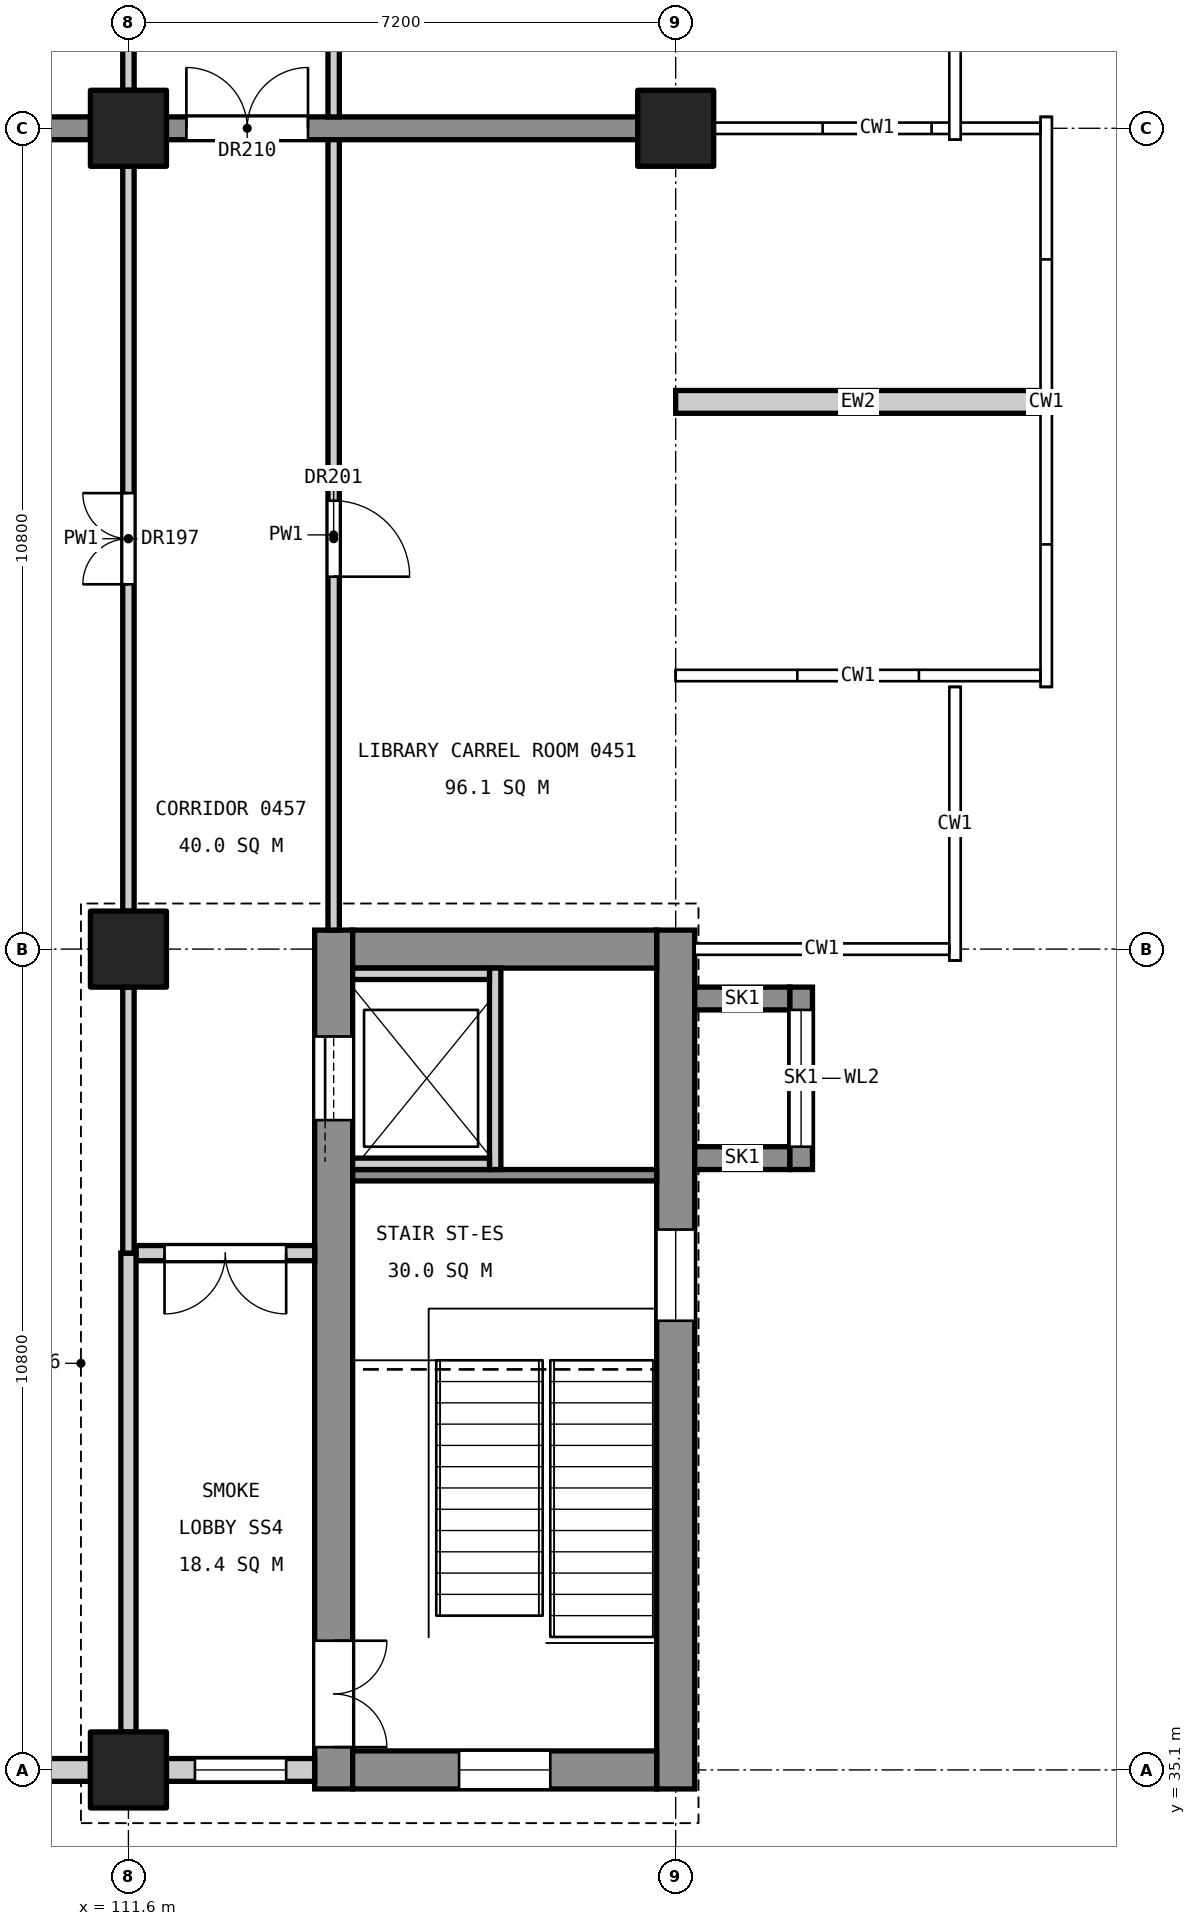
"""IFC4 building model, lengths in metres.
Left out: names, types, materials, properties, quantities, classifications, styles, units other than length and angle.
Written with IfcOpenShell. Run it as: python <this file> out.ifc"""

import sys

from ifc_helpers import new_model, si_unit, direction, frame, frame_2d, origin, origin_2d, place, context, subcontext, project, spatial, rectangle, extrude, element, fill, save


model = new_model("IFC4")
c1 = context("Model", 3, precision=1e-05, world=origin(), true_north=direction((0.0, 1.0)))
c2 = subcontext(c1, "Body", "Model", "MODEL_VIEW")
j1 = project(units=[si_unit("LENGTHUNIT", "METRE"), si_unit("PLANEANGLEUNIT", "RADIAN")], contexts=[c1])
p1 = place(None, origin())
s1 = spatial("IfcSite", under=j1, at=p1, CompositionType="ELEMENT")
p2 = place(p1, origin())
s2 = spatial("IfcBuilding", under=s1, at=p2, CompositionType="ELEMENT")
p3 = place(p2, frame((0.0, 0.0, 22.2)))
s3 = spatial("IfcBuildingStorey", under=s2, at=p3, CompositionType="ELEMENT", Elevation=22.2)
for number, where, z_axis, x_axis in (
    (1, (118.8, 56.7, 0.0), (0.0, 0.0, 1.0), (1.0, 0.0, 0.0)),
    (2, (111.6, 35.1, 0.0), (0.0, 0.0, 1.0), (1.0, 0.0, 0.0)),
    (3, (111.6, 45.9, 0.0), (0.0, 0.0, 1.0), (1.0, 0.0, 0.0)),
    (4, (111.6, 56.7, 0.0), (0.0, 0.0, 1.0), (1.0, 0.0, 0.0)),
):
    element("IfcColumn", number, at=place(p3, frame(where, z_axis=z_axis, x_axis=x_axis)), inside=s3, PredefinedType="COLUMN", context=c2, shape_type="SweptSolid", body=[
        extrude(rectangle(XDim=1.0, YDim=1.0, at=origin_2d()), origin(), (0.0, 0.0, 1.0), 4.8),
    ])
p4 = place(p3, frame((118.8, 34.85, 0.0), z_axis=(0.0, 0.0, 1.0), x_axis=(0.0, 1.0, 0.0)))
e5 = element("IfcWall", 5, at=p4, inside=s3, PredefinedType="SHEAR", context=c2, shape_type="SweptSolid", body=[
    extrude(rectangle(XDim=11.3, YDim=0.5, at=frame_2d((5.65, 0.0))), origin(), (0.0, 0.0, 1.0), 4.55),
])
p5 = place(p4, frame((6.16, 0.0, 3.4)))
e6 = element("IfcOpeningElement", 6, at=p5, cuts=e5, PredefinedType="OPENING", context=c2, shape_type="SweptSolid", body=[
    extrude(rectangle(XDim=1.2, YDim=0.9, at=frame_2d((0.6, 0.45))), frame((0.0, 0.26, 0.0), z_axis=(0.0, -1.0, 0.0), x_axis=(1.0, 0.0, 0.0)), (0.0, 0.0, 1.0), 0.52),
])
p6 = place(p3, frame((114.3, 34.85, 0.0), z_axis=(0.0, 0.0, 1.0), x_axis=(0.0, 1.0, 0.0)))
e7 = element("IfcWall", 7, at=p6, inside=s3, PredefinedType="SHEAR", context=c2, shape_type="SweptSolid", body=[
    extrude(rectangle(XDim=11.3, YDim=0.5, at=frame_2d((5.65, 0.0))), origin(), (0.0, 0.0, 1.0), 4.55),
])
p7 = place(p6, frame((0.55, 0.0, 0.0)))
e8 = element("IfcOpeningElement", 8, at=p7, cuts=e7, PredefinedType="OPENING", context=c2, shape_type="SweptSolid", body=[
    extrude(rectangle(XDim=1.4, YDim=2.1, at=frame_2d((0.7, 1.05))), frame((0.0, 0.26, 0.0), z_axis=(0.0, -1.0, 0.0), x_axis=(1.0, 0.0, 0.0)), (0.0, 0.0, 1.0), 0.52),
])
p8 = place(p6, frame((8.8, 0.0, 0.0)))
e9 = element("IfcOpeningElement", 9, at=p8, cuts=e7, PredefinedType="OPENING", context=c2, shape_type="SweptSolid", body=[
    extrude(rectangle(XDim=1.1, YDim=2.1, at=frame_2d((0.55, 1.05))), frame((0.0, 0.26, 0.0), z_axis=(0.0, -1.0, 0.0), x_axis=(1.0, 0.0, 0.0)), (0.0, 0.0, 1.0), 0.52),
])
p9 = place(p3, frame((118.55, 35.1, 0.0), z_axis=(0.0, 0.0, 1.0), x_axis=(-1.0, 0.0, 0.0)))
e10 = element("IfcWall", 10, at=p9, inside=s3, PredefinedType="SHEAR", context=c2, shape_type="SweptSolid", body=[
    extrude(rectangle(XDim=4.0, YDim=0.5, at=frame_2d((2.0, 0.0))), origin(), (0.0, 0.0, 1.0), 4.55),
])
p10 = place(p9, frame((1.4, 0.0, 3.4)))
e11 = element("IfcOpeningElement", 11, at=p10, cuts=e10, PredefinedType="OPENING", context=c2, shape_type="SweptSolid", body=[
    extrude(rectangle(XDim=1.2, YDim=0.9, at=frame_2d((0.6, 0.45))), frame((0.0, 0.26, 0.0), z_axis=(0.0, -1.0, 0.0), x_axis=(1.0, 0.0, 0.0)), (0.0, 0.0, 1.0), 0.52),
])
p11 = place(p3, frame((118.55, 45.9, 0.0), z_axis=(0.0, 0.0, 1.0), x_axis=(-1.0, 0.0, 0.0)))
e12 = element("IfcWall", 12, at=p11, inside=s3, PredefinedType="SHEAR", context=c2, shape_type="SweptSolid", body=[
    extrude(rectangle(XDim=4.0, YDim=0.5, at=frame_2d((2.0, 0.0))), origin(), (0.0, 0.0, 1.0), 4.55),
])
p12 = place(p3, frame((120.45, 43.0, 0.0), z_axis=(0.0, 0.0, 1.0), x_axis=(0.0, 1.0, 0.0)))
e13 = element("IfcWall", 13, at=p12, inside=s3, PredefinedType="SHEAR", context=c2, shape_type="SweptSolid", body=[
    extrude(rectangle(XDim=2.4, YDim=0.3, at=frame_2d((1.2, 0.0))), origin(), (0.0, 0.0, 1.0), 4.8),
])
p13 = place(p12, frame((0.3, 0.0, 3.0)))
e14 = element("IfcOpeningElement", 14, at=p13, cuts=e13, PredefinedType="OPENING", context=c2, shape_type="SweptSolid", body=[
    extrude(rectangle(XDim=1.8, YDim=1.2, at=frame_2d((0.9, 0.6))), frame((0.0, 0.16, 0.0), z_axis=(0.0, -1.0, 0.0), x_axis=(1.0, 0.0, 0.0)), (0.0, 0.0, 1.0), 0.32),
])
for number, where, z_axis, x_axis in (
    (15, (119.05, 43.15, 0.0), (0.0, 0.0, 1.0), (1.0, 0.0, 0.0)),
    (16, (119.05, 45.25, 0.0), (0.0, 0.0, 1.0), (1.0, 0.0, 0.0)),
):
    element("IfcWall", number, at=place(p3, frame(where, z_axis=z_axis, x_axis=x_axis)), inside=s3, PredefinedType="SHEAR", context=c2, shape_type="SweptSolid", body=[
        extrude(rectangle(XDim=1.25, YDim=0.3, at=frame_2d((0.625, 0.0))), origin(), (0.0, 0.0, 1.0), 4.8),
    ])
p14 = place(p3, frame((118.3, 56.7, 0.0), z_axis=(0.0, 0.0, 1.0), x_axis=(-1.0, 0.0, 0.0)))
e17 = element("IfcWall", 17, at=p14, inside=s3, PredefinedType="SHEAR", context=c2, shape_type="SweptSolid", body=[
    extrude(rectangle(XDim=6.2, YDim=0.3, at=frame_2d((3.1, 0.0))), origin(), (0.0, 0.0, 1.0), 4.55),
])
p15 = place(p14, frame((4.337, 0.0, 0.0)))
e18 = element("IfcOpeningElement", 18, at=p15, cuts=e17, PredefinedType="OPENING", context=c2, shape_type="SweptSolid", body=[
    extrude(rectangle(XDim=1.6, YDim=2.1, at=frame_2d((0.8, 1.05))), frame((0.0, 0.16, 0.0), z_axis=(0.0, -1.0, 0.0), x_axis=(1.0, 0.0, 0.0)), (0.0, 0.0, 1.0), 0.32),
])
p16 = place(p3, frame((111.1, 56.7, 0.0), z_axis=(0.0, 0.0, 1.0), x_axis=(-1.0, 0.0, 0.0)))
e19 = element("IfcWall", 19, at=p16, inside=s3, PredefinedType="SHEAR", context=c2, shape_type="SweptSolid", body=[
    extrude(rectangle(XDim=9.8, YDim=0.3, at=frame_2d((4.9, 0.0))), origin(), (0.0, 0.0, 1.0), 4.55),
])
p17 = place(p3, frame((118.55, 42.925, 0.0), z_axis=(0.0, 0.0, 1.0), x_axis=(-1.0, 0.0, 0.0)))
e20 = element("IfcWall", 20, at=p17, inside=s3, PredefinedType="SOLIDWALL", context=c2, shape_type="SweptSolid", body=[
    extrude(rectangle(XDim=4.0, YDim=0.15, at=frame_2d((2.0, 0.0))), origin(), (0.0, 0.0, 1.0), 4.55),
])
p18 = place(p3, frame((116.425, 43.0, 0.0), z_axis=(0.0, 0.0, 1.0), x_axis=(0.0, 1.0, 0.0)))
e21 = element("IfcWall", 21, at=p18, inside=s3, PredefinedType="SOLIDWALL", context=c2, shape_type="SweptSolid", body=[
    extrude(rectangle(XDim=2.65, YDim=0.15, at=frame_2d((1.325, 0.0))), origin(), (0.0, 0.0, 1.0), 4.8),
])
for number, where, z_axis, x_axis in (
    (22, (116.35, 43.075, 0.0), (0.0, 0.0, 1.0), (-1.0, 0.0, 0.0)),
    (23, (116.35, 45.575, 0.0), (0.0, 0.0, 1.0), (-1.0, 0.0, 0.0)),
):
    element("IfcWall", number, at=place(p3, frame(where, z_axis=z_axis, x_axis=x_axis)), inside=s3, PredefinedType="SOLIDWALL", context=c2, shape_type="SweptSolid", body=[
        extrude(rectangle(XDim=1.8, YDim=0.15, at=frame_2d((0.9, 0.0))), origin(), (0.0, 0.0, 1.0), 4.8),
    ])
p19 = place(p3, frame((114.05, 35.1, 0.0), z_axis=(0.0, 0.0, 1.0), x_axis=(-1.0, 0.0, 0.0)))
e24 = element("IfcWall", 24, at=p19, inside=s3, PredefinedType="STANDARD", context=c2, shape_type="SweptSolid", body=[
    extrude(rectangle(XDim=1.95, YDim=0.3, at=frame_2d((0.975, 0.0))), origin(), (0.0, 0.0, 1.0), 3.85),
])
p20 = place(p19, frame((0.375, 0.0, 0.9)))
e25 = element("IfcOpeningElement", 25, at=p20, cuts=e24, PredefinedType="OPENING", context=c2, shape_type="SweptSolid", body=[
    extrude(rectangle(XDim=1.2, YDim=2.4, at=frame_2d((0.6, 1.2))), frame((0.0, 0.16, 0.0), z_axis=(0.0, -1.0, 0.0), x_axis=(1.0, 0.0, 0.0)), (0.0, 0.0, 1.0), 0.32),
])
p21 = place(p3, frame((111.1, 35.1, 0.0), z_axis=(0.0, 0.0, 1.0), x_axis=(-1.0, 0.0, 0.0)))
e26 = element("IfcWall", 26, at=p21, inside=s3, PredefinedType="STANDARD", context=c2, shape_type="SweptSolid", body=[
    extrude(rectangle(XDim=9.8, YDim=0.3, at=frame_2d((4.9, 0.0))), origin(), (0.0, 0.0, 1.0), 3.85),
])
p22 = place(p21, frame((0.65, 0.0, 0.9)))
e27 = element("IfcOpeningElement", 27, at=p22, cuts=e26, PredefinedType="OPENING", context=c2, shape_type="SweptSolid", body=[
    extrude(rectangle(XDim=1.8, YDim=2.4, at=frame_2d((0.9, 1.2))), frame((0.0, 0.16, 0.0), z_axis=(0.0, -1.0, 0.0), x_axis=(1.0, 0.0, 0.0)), (0.0, 0.0, 1.0), 0.32),
])
p23 = place(p21, frame((4.525, 0.0, 0.8)))
e28 = element("IfcOpeningElement", 28, at=p23, cuts=e26, PredefinedType="OPENING", context=c2, shape_type="SweptSolid", body=[
    extrude(rectangle(XDim=0.75, YDim=1.2, at=frame_2d((0.375, 0.6))), frame((0.0, 0.16, 0.0), z_axis=(0.0, -1.0, 0.0), x_axis=(1.0, 0.0, 0.0)), (0.0, 0.0, 1.0), 0.32),
])
p24 = place(p21, frame((7.35, 0.0, 0.9)))
e29 = element("IfcOpeningElement", 29, at=p24, cuts=e26, PredefinedType="OPENING", context=c2, shape_type="SweptSolid", body=[
    extrude(rectangle(XDim=1.8, YDim=2.4, at=frame_2d((0.9, 1.2))), frame((0.0, 0.16, 0.0), z_axis=(0.0, -1.0, 0.0), x_axis=(1.0, 0.0, 0.0)), (0.0, 0.0, 1.0), 0.32),
])
p25 = place(p3, frame((123.6, 53.1, 0.0), z_axis=(0.0, 0.0, 1.0), x_axis=(-1.0, 0.0, 0.0)))
e30 = element("IfcWall", 30, at=p25, inside=s3, PredefinedType="STANDARD", context=c2, shape_type="SweptSolid", body=[
    extrude(rectangle(XDim=4.8, YDim=0.3, at=frame_2d((2.4, 0.0))), origin(), (0.0, 0.0, 1.0), 3.65),
])
p26 = place(p3, frame((114.3, 46.15, 0.0), z_axis=(0.0, 0.0, 1.0), x_axis=(0.0, 1.0, 0.0)))
e31 = element("IfcWall", 31, at=p26, inside=s3, PredefinedType="PARTITIONING", context=c2, shape_type="SweptSolid", body=[
    extrude(rectangle(XDim=10.4, YDim=0.15, at=frame_2d((5.2, 0.0))), origin(), (0.0, 0.0, 1.0), 3.55),
])
p27 = place(p26, frame((4.65, 0.0, 0.0)))
e32 = element("IfcOpeningElement", 32, at=p27, cuts=e31, PredefinedType="OPENING", context=c2, shape_type="SweptSolid", body=[
    extrude(rectangle(XDim=1.0, YDim=2.1, at=frame_2d((0.5, 1.05))), frame((0.0, 0.085, 0.0), z_axis=(0.0, -1.0, 0.0), x_axis=(1.0, 0.0, 0.0)), (0.0, 0.0, 1.0), 0.17),
])
p28 = place(p3, frame((114.3, 56.85, 0.0), z_axis=(0.0, 0.0, 1.0), x_axis=(0.0, 1.0, 0.0)))
e33 = element("IfcWall", 33, at=p28, inside=s3, PredefinedType="PARTITIONING", context=c2, shape_type="SweptSolid", body=[
    extrude(rectangle(XDim=3.2, YDim=0.15, at=frame_2d((1.6, 0.0))), origin(), (0.0, 0.0, 1.0), 3.55),
])
p29 = place(p28, frame((1.15, 0.0, 0.0)))
e34 = element("IfcOpeningElement", 34, at=p29, cuts=e33, PredefinedType="OPENING", context=c2, shape_type="SweptSolid", body=[
    extrude(rectangle(XDim=1.0, YDim=2.1, at=frame_2d((0.5, 1.05))), frame((0.0, 0.085, 0.0), z_axis=(0.0, -1.0, 0.0), x_axis=(1.0, 0.0, 0.0)), (0.0, 0.0, 1.0), 0.17),
])
p30 = place(p3, frame((114.05, 41.9, 0.0), z_axis=(0.0, 0.0, 1.0), x_axis=(-1.0, 0.0, 0.0)))
e35 = element("IfcWall", 35, at=p30, inside=s3, PredefinedType="PARTITIONING", context=c2, shape_type="SweptSolid", body=[
    extrude(rectangle(XDim=2.35, YDim=0.2, at=frame_2d((1.175, 0.0))), origin(), (0.0, 0.0, 1.0), 3.55),
])
p31 = place(p30, frame((0.375, 0.0, 0.0)))
e36 = element("IfcOpeningElement", 36, at=p31, cuts=e35, PredefinedType="OPENING", context=c2, shape_type="SweptSolid", body=[
    extrude(rectangle(XDim=1.6, YDim=2.1, at=frame_2d((0.8, 1.05))), frame((0.0, 0.11, 0.0), z_axis=(0.0, -1.0, 0.0), x_axis=(1.0, 0.0, 0.0)), (0.0, 0.0, 1.0), 0.22),
])
p32 = place(p3, frame((111.6, 35.6, 0.0), z_axis=(0.0, 0.0, 1.0), x_axis=(0.0, 1.0, 0.0)))
e37 = element("IfcWall", 37, at=p32, inside=s3, PredefinedType="PARTITIONING", context=c2, shape_type="SweptSolid", body=[
    extrude(rectangle(XDim=6.3, YDim=0.2, at=frame_2d((3.15, 0.0))), origin(), (0.0, 0.0, 1.0), 3.55),
])
p33 = place(p3, frame((111.6, 41.9, 0.0), z_axis=(0.0, 0.0, 1.0), x_axis=(0.0, 1.0, 0.0)))
e38 = element("IfcWall", 38, at=p33, inside=s3, PredefinedType="PARTITIONING", context=c2, shape_type="SweptSolid", body=[
    extrude(rectangle(XDim=3.5, YDim=0.15, at=frame_2d((1.75, 0.0))), origin(), (0.0, 0.0, 1.0), 3.55),
])
p34 = place(p3, frame((111.6, 46.4, 0.0), z_axis=(0.0, 0.0, 1.0), x_axis=(0.0, 1.0, 0.0)))
e39 = element("IfcWall", 39, at=p34, inside=s3, PredefinedType="PARTITIONING", context=c2, shape_type="SweptSolid", body=[
    extrude(rectangle(XDim=9.8, YDim=0.15, at=frame_2d((4.9, 0.0))), origin(), (0.0, 0.0, 1.0), 3.55),
])
p35 = place(p34, frame((4.3, 0.0, 0.0)))
e40 = element("IfcOpeningElement", 40, at=p35, cuts=e39, PredefinedType="OPENING", context=c2, shape_type="SweptSolid", body=[
    extrude(rectangle(XDim=1.2, YDim=2.1, at=frame_2d((0.6, 1.05))), frame((0.0, 0.085, 0.0), z_axis=(0.0, -1.0, 0.0), x_axis=(1.0, 0.0, 0.0)), (0.0, 0.0, 1.0), 0.17),
])
p36 = place(p3, frame((111.6, 57.2, 0.0), z_axis=(0.0, 0.0, 1.0), x_axis=(0.0, 1.0, 0.0)))
e41 = element("IfcWall", 41, at=p36, inside=s3, PredefinedType="PARTITIONING", context=c2, shape_type="SweptSolid", body=[
    extrude(rectangle(XDim=3.1, YDim=0.15, at=frame_2d((1.55, 0.0))), origin(), (0.0, 0.0, 1.0), 3.55),
])
p37 = place(p7, frame((1.4, 0.0, 0.0), z_axis=(0.0, 0.0, 1.0), x_axis=(-1.0, 0.0, 0.0)))
e42 = element("IfcDoor", 42, at=p37, inside=s3, OperationType="DOUBLE_DOOR_SINGLE_SWING", PredefinedType="DOOR", context=c2, shape_type="SweptSolid", body=[
    extrude(rectangle(XDim=1.4, YDim=2.1, at=frame_2d((0.7, 1.05))), frame((0.0, 0.025, 0.0), z_axis=(0.0, -1.0, 0.0), x_axis=(1.0, 0.0, 0.0)), (0.0, 0.0, 1.0), 0.05),
])
fill(e8, e42)
p38 = place(p8, origin())
e43 = element("IfcDoor", 43, at=p38, inside=s3, OperationType="SLIDING_TO_LEFT", PredefinedType="DOOR", context=c2, shape_type="SweptSolid", body=[
    extrude(rectangle(XDim=1.1, YDim=2.1, at=frame_2d((0.55, 1.05))), frame((0.0, 0.025, 0.0), z_axis=(0.0, -1.0, 0.0), x_axis=(1.0, 0.0, 0.0)), (0.0, 0.0, 1.0), 0.05),
])
fill(e9, e43)
p39 = place(p20, origin())
e44 = element("IfcWindow", 44, at=p39, inside=s3, PartitioningType="SINGLE_PANEL", PredefinedType="WINDOW", context=c2, shape_type="SweptSolid", body=[
    extrude(rectangle(XDim=1.2, YDim=2.4, at=frame_2d((0.6, 1.2))), frame((0.0, 0.03, 0.0), z_axis=(0.0, -1.0, 0.0), x_axis=(1.0, 0.0, 0.0)), (0.0, 0.0, 1.0), 0.06),
])
fill(e25, e44)
p40 = place(p5, origin())
e45 = element("IfcWindow", 45, at=p40, inside=s3, PartitioningType="SINGLE_PANEL", PredefinedType="WINDOW", context=c2, shape_type="SweptSolid", body=[
    extrude(rectangle(XDim=1.2, YDim=0.9, at=frame_2d((0.6, 0.45))), frame((0.0, 0.03, 0.0), z_axis=(0.0, -1.0, 0.0), x_axis=(1.0, 0.0, 0.0)), (0.0, 0.0, 1.0), 0.06),
])
fill(e6, e45)
p41 = place(p10, origin())
e46 = element("IfcWindow", 46, at=p41, inside=s3, PartitioningType="SINGLE_PANEL", PredefinedType="WINDOW", context=c2, shape_type="SweptSolid", body=[
    extrude(rectangle(XDim=1.2, YDim=0.9, at=frame_2d((0.6, 0.45))), frame((0.0, 0.03, 0.0), z_axis=(0.0, -1.0, 0.0), x_axis=(1.0, 0.0, 0.0)), (0.0, 0.0, 1.0), 0.06),
])
fill(e11, e46)
p42 = place(p13, origin())
e47 = element("IfcWindow", 47, at=p42, inside=s3, PartitioningType="SINGLE_PANEL", PredefinedType="WINDOW", context=c2, shape_type="SweptSolid", body=[
    extrude(rectangle(XDim=1.8, YDim=1.2, at=frame_2d((0.9, 0.6))), frame((0.0, 0.03, 0.0), z_axis=(0.0, -1.0, 0.0), x_axis=(1.0, 0.0, 0.0)), (0.0, 0.0, 1.0), 0.06),
])
fill(e14, e47)
p43 = place(p35, origin())
e48 = element("IfcDoor", 48, at=p43, inside=s3, OperationType="DOUBLE_DOOR_SINGLE_SWING", PredefinedType="DOOR", context=c2, shape_type="SweptSolid", body=[
    extrude(rectangle(XDim=1.2, YDim=2.1, at=frame_2d((0.6, 1.05))), frame((0.0, 0.025, 0.0), z_axis=(0.0, -1.0, 0.0), x_axis=(1.0, 0.0, 0.0)), (0.0, 0.0, 1.0), 0.05),
])
fill(e40, e48)
p44 = place(p27, frame((1.0, 0.0, 0.0), z_axis=(0.0, 0.0, 1.0), x_axis=(-1.0, 0.0, 0.0)))
e49 = element("IfcDoor", 49, at=p44, inside=s3, OperationType="SINGLE_SWING_RIGHT", PredefinedType="DOOR", context=c2, shape_type="SweptSolid", body=[
    extrude(rectangle(XDim=1.0, YDim=2.1, at=frame_2d((0.5, 1.05))), frame((0.0, 0.025, 0.0), z_axis=(0.0, -1.0, 0.0), x_axis=(1.0, 0.0, 0.0)), (0.0, 0.0, 1.0), 0.05),
])
fill(e32, e49)
p45 = place(p31, origin())
e50 = element("IfcDoor", 50, at=p45, inside=s3, OperationType="DOUBLE_DOOR_SINGLE_SWING", PredefinedType="DOOR", context=c2, shape_type="SweptSolid", body=[
    extrude(rectangle(XDim=1.6, YDim=2.1, at=frame_2d((0.8, 1.05))), frame((0.0, 0.025, 0.0), z_axis=(0.0, -1.0, 0.0), x_axis=(1.0, 0.0, 0.0)), (0.0, 0.0, 1.0), 0.05),
])
fill(e36, e50)
p46 = place(p15, frame((1.6, 0.0, 0.0), z_axis=(0.0, 0.0, 1.0), x_axis=(-1.0, 0.0, 0.0)))
e51 = element("IfcDoor", 51, at=p46, inside=s3, OperationType="DOUBLE_DOOR_SINGLE_SWING", PredefinedType="DOOR", context=c2, shape_type="SweptSolid", body=[
    extrude(rectangle(XDim=1.6, YDim=2.1, at=frame_2d((0.8, 1.05))), frame((0.0, 0.025, 0.0), z_axis=(0.0, -1.0, 0.0), x_axis=(1.0, 0.0, 0.0)), (0.0, 0.0, 1.0), 0.05),
])
fill(e18, e51)
save(model, sys.argv[1])
